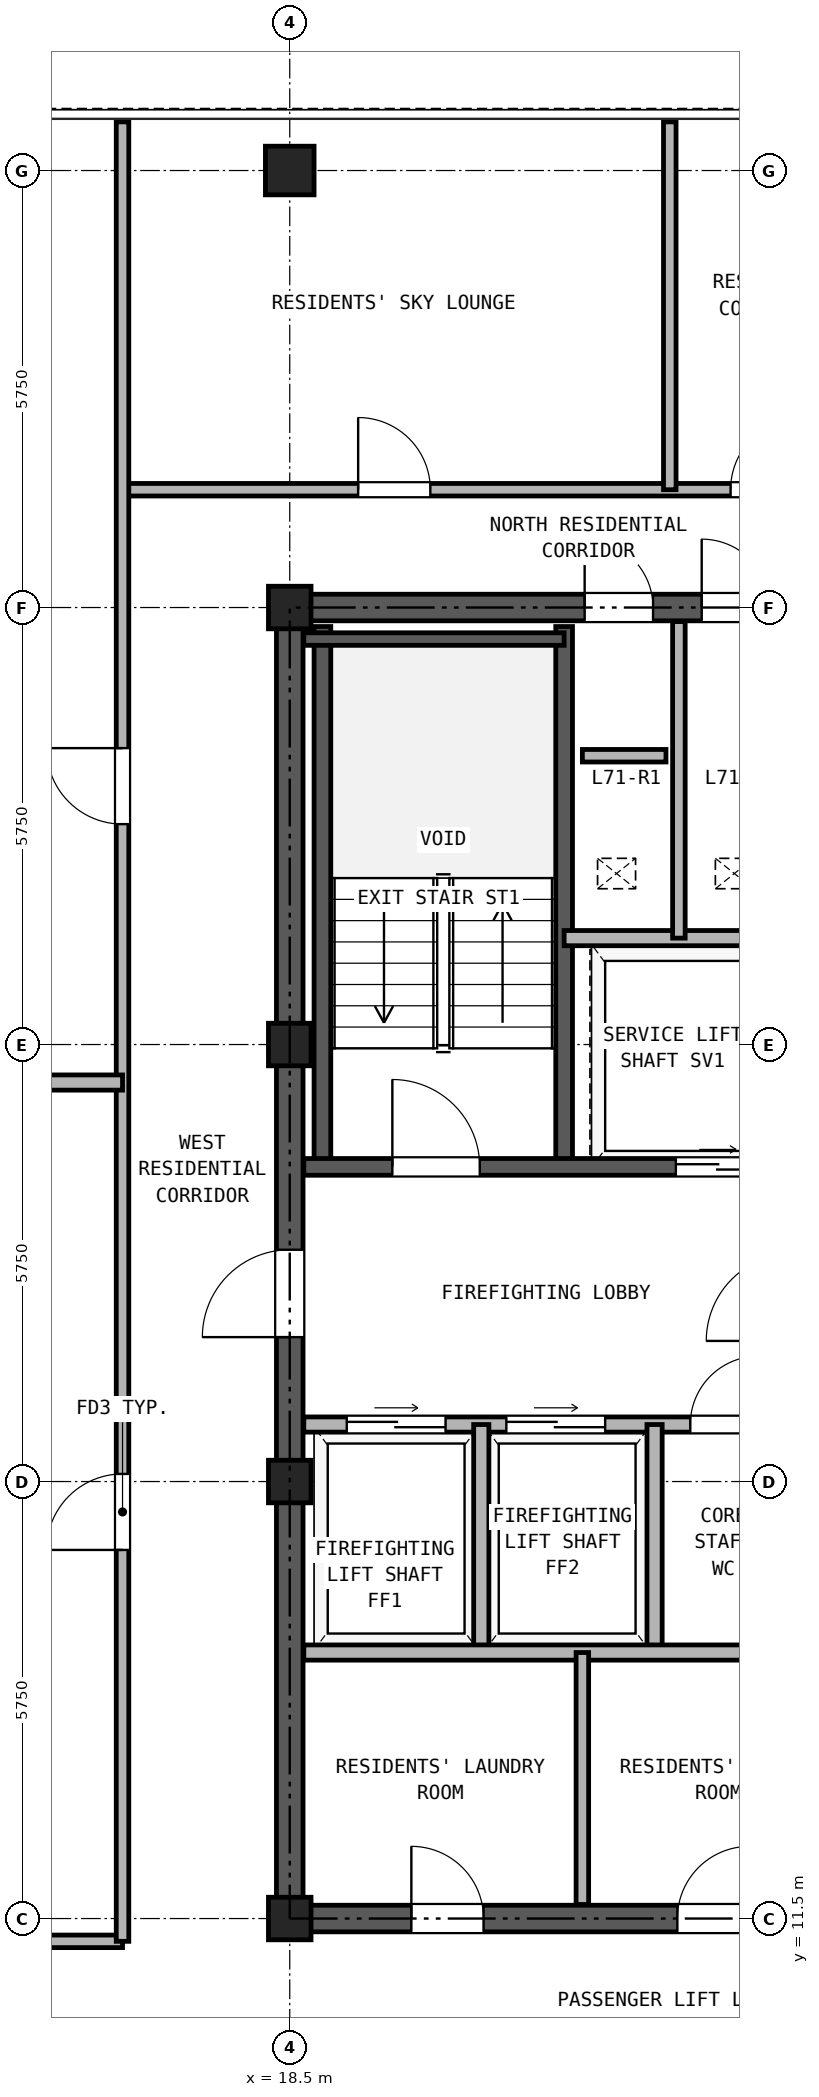
"""IFC4 building model, lengths in metres.
Left out: names, types, materials, properties, quantities, classifications, styles, units other than length and angle.
Written with IfcOpenShell. Run it as: python <this file> out.ifc"""

import sys

from ifc_helpers import new_model, si_unit, direction, frame, frame_2d, origin, origin_2d, place, context, subcontext, project, spatial, rectangle, hollow_rectangle, extrude, source, transform, mapped, element, fill, save


model = new_model("IFC4")
c1 = context("Model", 3, precision=1e-05, world=origin(), true_north=direction((0.0, 1.0)))
c2 = subcontext(c1, "Body", "Model", "MODEL_VIEW")
j1 = project(units=[si_unit("LENGTHUNIT", "METRE"), si_unit("PLANEANGLEUNIT", "RADIAN")], contexts=[c1])
p1 = place(None, origin())
s1 = spatial("IfcSite", under=j1, at=p1, CompositionType="ELEMENT")
p2 = place(p1, origin())
s2 = spatial("IfcBuilding", under=s1, at=p2, CompositionType="ELEMENT")
p3 = place(p2, frame((0.0, 0.0, 248.9)))
s3 = spatial("IfcBuildingStorey", under=s2, at=p3, CompositionType="ELEMENT", Elevation=248.9)
m1 = source(origin(), c2, "Body", "SweptSolid", [
    extrude(hollow_rectangle(XDim=0.64, YDim=0.64, WallThickness=0.035, at=origin_2d()), origin(), (0.0, 0.0, 1.0), 2.98),
])
p4 = place(p3, frame((18.5, 34.5, 0.0), z_axis=(0.0, 0.0, 1.0), x_axis=(1.0, 0.0, 0.0)))
e1 = element("IfcColumn", 1, at=p4, inside=s3, PredefinedType="COLUMN", context=c2, shape_type="MappedRepresentation", body=[
    mapped(m1, transform((0.0, 0.0, 0.0), x_axis=(1.0, 0.0, 0.0), y_axis=(0.0, 1.0, 0.0), z_axis=(0.0, 0.0, 1.0), scale=1.0)),
])
m2 = source(origin(), c2, "Body", "SweptSolid", [
    extrude(hollow_rectangle(XDim=0.56, YDim=0.56, WallThickness=0.03, at=origin_2d()), origin(), (0.0, 0.0, 1.0), 2.98),
])
for number, where, z_axis, x_axis in (
    (2, (18.5, 11.5, 0.0), (0.0, 0.0, 1.0), (1.0, 0.0, 0.0)),
    (3, (18.5, 17.25, 0.0), (0.0, 0.0, 1.0), (1.0, 0.0, 0.0)),
    (4, (18.5, 23.0, 0.0), (0.0, 0.0, 1.0), (1.0, 0.0, 0.0)),
    (5, (18.5, 28.75, 0.0), (0.0, 0.0, 1.0), (1.0, 0.0, 0.0)),
):
    element("IfcColumn", number, at=place(p3, frame(where, z_axis=z_axis, x_axis=x_axis)), inside=s3, PredefinedType="COLUMN", context=c2, shape_type="MappedRepresentation", body=[
        mapped(m2, transform((0.0, 0.0, 0.0), x_axis=(1.0, 0.0, 0.0), y_axis=(0.0, 1.0, 0.0), z_axis=(0.0, 0.0, 1.0), scale=1.0)),
    ])
p5 = place(p3, frame((18.325, 11.5, 0.0), z_axis=(0.0, 0.0, 1.0), x_axis=(1.0, 0.0, 0.0)))
e6 = element("IfcWall", 6, at=p5, inside=s3, PredefinedType="SHEAR", context=c2, shape_type="SweptSolid", body=[
    extrude(rectangle(XDim=10.35, YDim=0.35, at=frame_2d((5.175, 0.0))), origin(), (0.0, 0.0, 1.0), 2.98),
])
p6 = place(p5, frame((1.775, 0.0, 0.0)))
e7 = element("IfcOpeningElement", 7, at=p6, cuts=e6, PredefinedType="OPENING", context=c2, shape_type="SweptSolid", body=[
    extrude(rectangle(XDim=0.95, YDim=2.15, at=frame_2d((0.475, 1.075))), frame((0.0, 0.185, 0.0), z_axis=(0.0, -1.0, 0.0), x_axis=(1.0, 0.0, 0.0)), (0.0, 0.0, 1.0), 0.37),
])
p7 = place(p5, frame((5.275, 0.0, 0.0)))
e8 = element("IfcOpeningElement", 8, at=p7, cuts=e6, PredefinedType="OPENING", context=c2, shape_type="SweptSolid", body=[
    extrude(rectangle(XDim=0.95, YDim=2.15, at=frame_2d((0.475, 1.075))), frame((0.0, 0.185, 0.0), z_axis=(0.0, -1.0, 0.0), x_axis=(1.0, 0.0, 0.0)), (0.0, 0.0, 1.0), 0.37),
])
p8 = place(p5, frame((8.175, 0.0, 0.0)))
e9 = element("IfcOpeningElement", 9, at=p8, cuts=e6, PredefinedType="OPENING", context=c2, shape_type="SweptSolid", body=[
    extrude(rectangle(XDim=1.1, YDim=2.25, at=frame_2d((0.55, 1.125))), frame((0.0, 0.185, 0.0), z_axis=(0.0, -1.0, 0.0), x_axis=(1.0, 0.0, 0.0)), (0.0, 0.0, 1.0), 0.37),
])
p9 = place(p3, frame((18.325, 28.75, 0.0), z_axis=(0.0, 0.0, 1.0), x_axis=(1.0, 0.0, 0.0)))
e10 = element("IfcWall", 10, at=p9, inside=s3, PredefinedType="SHEAR", context=c2, shape_type="SweptSolid", body=[
    extrude(rectangle(XDim=10.35, YDim=0.35, at=frame_2d((5.175, 0.0))), origin(), (0.0, 0.0, 1.0), 2.98),
])
p10 = place(p9, frame((4.055, 0.0, 0.0)))
e11 = element("IfcOpeningElement", 11, at=p10, cuts=e10, PredefinedType="OPENING", context=c2, shape_type="SweptSolid", body=[
    extrude(rectangle(XDim=0.9, YDim=2.05, at=frame_2d((0.45, 1.025))), frame((0.0, 0.185, 0.0), z_axis=(0.0, -1.0, 0.0), x_axis=(1.0, 0.0, 0.0)), (0.0, 0.0, 1.0), 0.37),
])
p11 = place(p9, frame((5.595, 0.0, 0.0)))
e12 = element("IfcOpeningElement", 12, at=p11, cuts=e10, PredefinedType="OPENING", context=c2, shape_type="SweptSolid", body=[
    extrude(rectangle(XDim=0.9, YDim=2.05, at=frame_2d((0.45, 1.025))), frame((0.0, 0.185, 0.0), z_axis=(0.0, -1.0, 0.0), x_axis=(1.0, 0.0, 0.0)), (0.0, 0.0, 1.0), 0.37),
])
p12 = place(p3, frame((18.5, 11.675, 0.0), z_axis=(0.0, 0.0, 1.0), x_axis=(0.0, 1.0, 0.0)))
e13 = element("IfcWall", 13, at=p12, inside=s3, PredefinedType="SHEAR", context=c2, shape_type="SweptSolid", body=[
    extrude(rectangle(XDim=16.9, YDim=0.35, at=frame_2d((8.45, 0.0))), origin(), (0.0, 0.0, 1.0), 2.98),
])
p13 = place(p12, frame((7.475, 0.0, 0.0)))
e14 = element("IfcOpeningElement", 14, at=p13, cuts=e13, PredefinedType="OPENING", context=c2, shape_type="SweptSolid", body=[
    extrude(rectangle(XDim=1.15, YDim=2.2, at=frame_2d((0.575, 1.1))), frame((0.0, 0.185, 0.0), z_axis=(0.0, -1.0, 0.0), x_axis=(1.0, 0.0, 0.0)), (0.0, 0.0, 1.0), 0.37),
])
for number, where, z_axis, x_axis in (
    (15, (18.93, 21.39, 0.0), (0.0, 0.0, 1.0), (0.0, 1.0, 0.0)),
    (16, (22.11, 21.39, 0.0), (0.0, 0.0, 1.0), (0.0, 1.0, 0.0)),
):
    element("IfcWall", number, at=place(p3, frame(where, z_axis=z_axis, x_axis=x_axis)), inside=s3, PredefinedType="SOLIDWALL", context=c2, shape_type="SweptSolid", body=[
        extrude(rectangle(XDim=7.11, YDim=0.22, at=frame_2d((3.555, 0.0))), origin(), (0.0, 0.0, 1.0), 2.98),
    ])
p14 = place(p3, frame((18.685, 28.335, 0.0), z_axis=(0.0, 0.0, 1.0), x_axis=(1.0, 0.0, 0.0)))
e17 = element("IfcWall", 17, at=p14, inside=s3, PredefinedType="PARTITIONING", context=c2, shape_type="SweptSolid", body=[
    extrude(rectangle(XDim=3.425, YDim=0.165, at=frame_2d((1.712, 0.0))), origin(), (0.0, 0.0, 1.0), 2.98),
])
p15 = place(p3, frame((18.685, 21.39, 0.0), z_axis=(0.0, 0.0, 1.0), x_axis=(1.0, 0.0, 0.0)))
e18 = element("IfcWall", 18, at=p15, inside=s3, PredefinedType="SOLIDWALL", context=c2, shape_type="SweptSolid", body=[
    extrude(rectangle(XDim=6.445, YDim=0.22, at=frame_2d((3.222, 0.0))), origin(), (0.0, 0.0, 1.0), 2.98),
])
p16 = place(p15, frame((1.165, 0.0, 0.0)))
e19 = element("IfcOpeningElement", 19, at=p16, cuts=e18, PredefinedType="OPENING", context=c2, shape_type="SweptSolid", body=[
    extrude(rectangle(XDim=1.15, YDim=2.2, at=frame_2d((0.575, 1.1))), frame((0.0, 0.12, 0.0), z_axis=(0.0, -1.0, 0.0), x_axis=(1.0, 0.0, 0.0)), (0.0, 0.0, 1.0), 0.24),
])
p17 = place(p15, frame((4.895, 0.0, 0.0)))
e20 = element("IfcOpeningElement", 20, at=p17, cuts=e18, PredefinedType="OPENING", context=c2, shape_type="SweptSolid", body=[
    extrude(rectangle(XDim=1.1, YDim=2.25, at=frame_2d((0.55, 1.125))), frame((0.0, 0.12, 0.0), z_axis=(0.0, -1.0, 0.0), x_axis=(1.0, 0.0, 0.0)), (0.0, 0.0, 1.0), 0.24),
])
p18 = place(p3, frame((22.11, 24.4, 0.0), z_axis=(0.0, 0.0, 1.0), x_axis=(1.0, 0.0, 0.0)))
e21 = element("IfcWall", 21, at=p18, inside=s3, PredefinedType="PARTITIONING", context=c2, shape_type="SweptSolid", body=[
    extrude(rectangle(XDim=3.02, YDim=0.2, at=frame_2d((1.51, 0.0))), origin(), (0.0, 0.0, 1.0), 2.98),
])
p19 = place(p3, frame((23.62, 24.4, 0.0), z_axis=(0.0, 0.0, 1.0), x_axis=(0.0, 1.0, 0.0)))
e22 = element("IfcWall", 22, at=p19, inside=s3, PredefinedType="PARTITIONING", context=c2, shape_type="SweptSolid", body=[
    extrude(rectangle(XDim=4.165, YDim=0.165, at=frame_2d((2.083, 0.0))), origin(), (0.0, 0.0, 1.0), 2.98),
])
p20 = place(p3, frame((18.685, 18.0, 0.0), z_axis=(0.0, 0.0, 1.0), x_axis=(1.0, 0.0, 0.0)))
e23 = element("IfcWall", 23, at=p20, inside=s3, PredefinedType="PARTITIONING", context=c2, shape_type="SweptSolid", body=[
    extrude(rectangle(XDim=9.63, YDim=0.2, at=frame_2d((4.815, 0.0))), origin(), (0.0, 0.0, 1.0), 2.98),
])
p21 = place(p20, frame((0.565, 0.0, 0.0)))
e24 = element("IfcOpeningElement", 24, at=p21, cuts=e23, PredefinedType="OPENING", context=c2, shape_type="SweptSolid", body=[
    extrude(rectangle(XDim=1.3, YDim=2.3, at=frame_2d((0.65, 1.15))), frame((0.0, 0.11, 0.0), z_axis=(0.0, -1.0, 0.0), x_axis=(1.0, 0.0, 0.0)), (0.0, 0.0, 1.0), 0.22),
])
p22 = place(p20, frame((2.665, 0.0, 0.0)))
e25 = element("IfcOpeningElement", 25, at=p22, cuts=e23, PredefinedType="OPENING", context=c2, shape_type="SweptSolid", body=[
    extrude(rectangle(XDim=1.3, YDim=2.3, at=frame_2d((0.65, 1.15))), frame((0.0, 0.11, 0.0), z_axis=(0.0, -1.0, 0.0), x_axis=(1.0, 0.0, 0.0)), (0.0, 0.0, 1.0), 0.22),
])
p23 = place(p20, frame((5.085, 0.0, 0.0)))
e26 = element("IfcOpeningElement", 26, at=p23, cuts=e23, PredefinedType="OPENING", context=c2, shape_type="SweptSolid", body=[
    extrude(rectangle(XDim=0.9, YDim=2.05, at=frame_2d((0.45, 1.025))), frame((0.0, 0.11, 0.0), z_axis=(0.0, -1.0, 0.0), x_axis=(1.0, 0.0, 0.0)), (0.0, 0.0, 1.0), 0.22),
])
p24 = place(p20, frame((8.215, 0.0, 0.0)))
e27 = element("IfcOpeningElement", 27, at=p24, cuts=e23, PredefinedType="OPENING", context=c2, shape_type="SweptSolid", body=[
    extrude(rectangle(XDim=0.9, YDim=2.05, at=frame_2d((0.45, 1.025))), frame((0.0, 0.11, 0.0), z_axis=(0.0, -1.0, 0.0), x_axis=(1.0, 0.0, 0.0)), (0.0, 0.0, 1.0), 0.22),
])
for number, where, z_axis, x_axis in (
    (28, (21.02, 15.0, 0.0), (0.0, 0.0, 1.0), (0.0, 1.0, 0.0)),
    (29, (23.3, 15.0, 0.0), (0.0, 0.0, 1.0), (0.0, 1.0, 0.0)),
):
    element("IfcWall", number, at=place(p3, frame(where, z_axis=z_axis, x_axis=x_axis)), inside=s3, PredefinedType="PARTITIONING", context=c2, shape_type="SweptSolid", body=[
        extrude(rectangle(XDim=3.0, YDim=0.2, at=frame_2d((1.5, 0.0))), origin(), (0.0, 0.0, 1.0), 2.98),
    ])
p25 = place(p3, frame((18.685, 15.0, 0.0), z_axis=(0.0, 0.0, 1.0), x_axis=(1.0, 0.0, 0.0)))
e30 = element("IfcWall", 30, at=p25, inside=s3, PredefinedType="PARTITIONING", context=c2, shape_type="SweptSolid", body=[
    extrude(rectangle(XDim=9.63, YDim=0.2, at=frame_2d((4.815, 0.0))), origin(), (0.0, 0.0, 1.0), 2.98),
])
p26 = place(p3, frame((22.35, 11.685, 0.0), z_axis=(0.0, 0.0, 1.0), x_axis=(0.0, 1.0, 0.0)))
e31 = element("IfcWall", 31, at=p26, inside=s3, PredefinedType="PARTITIONING", context=c2, shape_type="SweptSolid", body=[
    extrude(rectangle(XDim=3.315, YDim=0.165, at=frame_2d((1.657, 0.0))), origin(), (0.0, 0.0, 1.0), 2.98),
])
p27 = place(p3, frame((8.56, 11.2, 0.0), z_axis=(0.0, 0.0, 1.0), x_axis=(1.0, 0.0, 0.0)))
e32 = element("IfcWall", 32, at=p27, inside=s3, PredefinedType="PARTITIONING", context=c2, shape_type="SweptSolid", body=[
    extrude(rectangle(XDim=7.74, YDim=0.165, at=frame_2d((3.87, 0.0))), origin(), (0.0, 0.0, 1.0), 2.98),
])
p28 = place(p3, frame((16.3, 30.3, 0.0), z_axis=(0.0, 0.0, 1.0), x_axis=(1.0, 0.0, 0.0)))
e33 = element("IfcWall", 33, at=p28, inside=s3, PredefinedType="PARTITIONING", context=c2, shape_type="SweptSolid", body=[
    extrude(rectangle(XDim=14.4, YDim=0.165, at=frame_2d((7.2, 0.0))), origin(), (0.0, 0.0, 1.0), 2.98),
])
p29 = place(p28, frame((3.1, 0.0, 0.0)))
e34 = element("IfcOpeningElement", 34, at=p29, cuts=e33, PredefinedType="OPENING", context=c2, shape_type="SweptSolid", body=[
    extrude(rectangle(XDim=0.95, YDim=2.15, at=frame_2d((0.475, 1.075))), frame((0.0, 0.093, 0.0), z_axis=(0.0, -1.0, 0.0), x_axis=(1.0, 0.0, 0.0)), (0.0, 0.0, 1.0), 0.185),
])
p30 = place(p28, frame((8.0, 0.0, 0.0)))
e35 = element("IfcOpeningElement", 35, at=p30, cuts=e33, PredefinedType="OPENING", context=c2, shape_type="SweptSolid", body=[
    extrude(rectangle(XDim=0.95, YDim=2.15, at=frame_2d((0.475, 1.075))), frame((0.0, 0.093, 0.0), z_axis=(0.0, -1.0, 0.0), x_axis=(1.0, 0.0, 0.0)), (0.0, 0.0, 1.0), 0.185),
])
p31 = place(p28, frame((10.8, 0.0, 0.0)))
e36 = element("IfcOpeningElement", 36, at=p31, cuts=e33, PredefinedType="OPENING", context=c2, shape_type="SweptSolid", body=[
    extrude(rectangle(XDim=0.92, YDim=2.1, at=frame_2d((0.46, 1.05))), frame((0.0, 0.093, 0.0), z_axis=(0.0, -1.0, 0.0), x_axis=(1.0, 0.0, 0.0)), (0.0, 0.0, 1.0), 0.185),
])
p32 = place(p3, frame((16.3, 11.2, 0.0), z_axis=(0.0, 0.0, 1.0), x_axis=(0.0, 1.0, 0.0)))
e37 = element("IfcWall", 37, at=p32, inside=s3, PredefinedType="PARTITIONING", context=c2, shape_type="SweptSolid", body=[
    extrude(rectangle(XDim=23.94, YDim=0.165, at=frame_2d((11.97, 0.0))), origin(), (0.0, 0.0, 1.0), 2.98),
])
p33 = place(p32, frame((5.15, 0.0, 0.0)))
e38 = element("IfcOpeningElement", 38, at=p33, cuts=e37, PredefinedType="OPENING", context=c2, shape_type="SweptSolid", body=[
    extrude(rectangle(XDim=1.0, YDim=2.15, at=frame_2d((0.5, 1.075))), frame((0.0, 0.093, 0.0), z_axis=(0.0, -1.0, 0.0), x_axis=(1.0, 0.0, 0.0)), (0.0, 0.0, 1.0), 0.185),
])
p34 = place(p32, frame((14.7, 0.0, 0.0)))
e39 = element("IfcOpeningElement", 39, at=p34, cuts=e37, PredefinedType="OPENING", context=c2, shape_type="SweptSolid", body=[
    extrude(rectangle(XDim=1.0, YDim=2.15, at=frame_2d((0.5, 1.075))), frame((0.0, 0.093, 0.0), z_axis=(0.0, -1.0, 0.0), x_axis=(1.0, 0.0, 0.0)), (0.0, 0.0, 1.0), 0.185),
])
p35 = place(p3, frame((5.36, 22.5, 0.0), z_axis=(0.0, 0.0, 1.0), x_axis=(1.0, 0.0, 0.0)))
e40 = element("IfcWall", 40, at=p35, inside=s3, PredefinedType="PARTITIONING", context=c2, shape_type="SweptSolid", body=[
    extrude(rectangle(XDim=10.94, YDim=0.2, at=frame_2d((5.47, 0.0))), origin(), (0.0, 0.0, 1.0), 2.98),
])
p36 = place(p3, frame((23.5, 30.3, 0.0), z_axis=(0.0, 0.0, 1.0), x_axis=(0.0, 1.0, 0.0)))
e41 = element("IfcWall", 41, at=p36, inside=s3, PredefinedType="PARTITIONING", context=c2, shape_type="SweptSolid", body=[
    extrude(rectangle(XDim=4.84, YDim=0.165, at=frame_2d((2.42, 0.0))), origin(), (0.0, 0.0, 1.0), 2.98),
])
p37 = place(p3, frame((22.35, 26.8, 0.0), z_axis=(0.0, 0.0, 1.0), x_axis=(1.0, 0.0, 0.0)))
e42 = element("IfcWall", 42, at=p37, inside=s3, PredefinedType="PARTITIONING", context=c2, shape_type="SweptSolid", body=[
    extrude(rectangle(XDim=1.1, YDim=0.165, at=frame_2d((0.55, 0.0))), origin(), (0.0, 0.0, 1.0), 2.98),
])
p38 = place(p16, frame((1.15, 0.0, 0.0), z_axis=(0.0, 0.0, 1.0), x_axis=(-1.0, 0.0, 0.0)))
e43 = element("IfcDoor", 43, at=p38, inside=s3, OperationType="SINGLE_SWING_LEFT", PredefinedType="DOOR", context=c2, shape_type="SweptSolid", body=[
    extrude(rectangle(XDim=1.15, YDim=2.2, at=frame_2d((0.575, 1.1))), frame((0.0, 0.025, 0.0), z_axis=(0.0, -1.0, 0.0), x_axis=(1.0, 0.0, 0.0)), (0.0, 0.0, 1.0), 0.05),
])
fill(e19, e43)
p39 = place(p17, frame((1.1, 0.0, 0.0), z_axis=(0.0, 0.0, 1.0), x_axis=(-1.0, 0.0, 0.0)))
e44 = element("IfcDoor", 44, at=p39, inside=s3, OperationType="DOUBLE_DOOR_SLIDING", PredefinedType="DOOR", context=c2, shape_type="SweptSolid", body=[
    extrude(rectangle(XDim=1.1, YDim=2.25, at=frame_2d((0.55, 1.125))), frame((0.0, 0.025, 0.0), z_axis=(0.0, -1.0, 0.0), x_axis=(1.0, 0.0, 0.0)), (0.0, 0.0, 1.0), 0.05),
])
fill(e20, e44)
p40 = place(p21, origin())
e45 = element("IfcDoor", 45, at=p40, inside=s3, OperationType="DOUBLE_DOOR_SLIDING", PredefinedType="DOOR", context=c2, shape_type="SweptSolid", body=[
    extrude(rectangle(XDim=1.3, YDim=2.3, at=frame_2d((0.65, 1.15))), frame((0.0, 0.025, 0.0), z_axis=(0.0, -1.0, 0.0), x_axis=(1.0, 0.0, 0.0)), (0.0, 0.0, 1.0), 0.05),
])
fill(e24, e45)
p41 = place(p22, origin())
e46 = element("IfcDoor", 46, at=p41, inside=s3, OperationType="DOUBLE_DOOR_SLIDING", PredefinedType="DOOR", context=c2, shape_type="SweptSolid", body=[
    extrude(rectangle(XDim=1.3, YDim=2.3, at=frame_2d((0.65, 1.15))), frame((0.0, 0.025, 0.0), z_axis=(0.0, -1.0, 0.0), x_axis=(1.0, 0.0, 0.0)), (0.0, 0.0, 1.0), 0.05),
])
fill(e25, e46)
p42 = place(p23, frame((0.9, 0.0, 0.0), z_axis=(0.0, 0.0, 1.0), x_axis=(-1.0, 0.0, 0.0)))
e47 = element("IfcDoor", 47, at=p42, inside=s3, OperationType="SINGLE_SWING_RIGHT", PredefinedType="DOOR", context=c2, shape_type="SweptSolid", body=[
    extrude(rectangle(XDim=0.9, YDim=2.05, at=frame_2d((0.45, 1.025))), frame((0.0, 0.025, 0.0), z_axis=(0.0, -1.0, 0.0), x_axis=(1.0, 0.0, 0.0)), (0.0, 0.0, 1.0), 0.05),
])
fill(e26, e47)
p43 = place(p13, frame((1.15, 0.0, 0.0), z_axis=(0.0, 0.0, 1.0), x_axis=(-1.0, 0.0, 0.0)))
e48 = element("IfcDoor", 48, at=p43, inside=s3, OperationType="SINGLE_SWING_LEFT", PredefinedType="DOOR", context=c2, shape_type="SweptSolid", body=[
    extrude(rectangle(XDim=1.15, YDim=2.2, at=frame_2d((0.575, 1.1))), frame((0.0, 0.025, 0.0), z_axis=(0.0, -1.0, 0.0), x_axis=(1.0, 0.0, 0.0)), (0.0, 0.0, 1.0), 0.05),
])
fill(e14, e48)
p44 = place(p10, origin())
e49 = element("IfcDoor", 49, at=p44, inside=s3, OperationType="SINGLE_SWING_LEFT", PredefinedType="DOOR", context=c2, shape_type="SweptSolid", body=[
    extrude(rectangle(XDim=0.9, YDim=2.05, at=frame_2d((0.45, 1.025))), frame((0.0, 0.025, 0.0), z_axis=(0.0, -1.0, 0.0), x_axis=(1.0, 0.0, 0.0)), (0.0, 0.0, 1.0), 0.05),
])
fill(e11, e49)
p45 = place(p11, origin())
e50 = element("IfcDoor", 50, at=p45, inside=s3, OperationType="SINGLE_SWING_LEFT", PredefinedType="DOOR", context=c2, shape_type="SweptSolid", body=[
    extrude(rectangle(XDim=0.9, YDim=2.05, at=frame_2d((0.45, 1.025))), frame((0.0, 0.025, 0.0), z_axis=(0.0, -1.0, 0.0), x_axis=(1.0, 0.0, 0.0)), (0.0, 0.0, 1.0), 0.05),
])
fill(e12, e50)
p46 = place(p6, frame((0.95, 0.0, 0.0), z_axis=(0.0, 0.0, 1.0), x_axis=(-1.0, 0.0, 0.0)))
e51 = element("IfcDoor", 51, at=p46, inside=s3, OperationType="SINGLE_SWING_LEFT", PredefinedType="DOOR", context=c2, shape_type="SweptSolid", body=[
    extrude(rectangle(XDim=0.95, YDim=2.15, at=frame_2d((0.475, 1.075))), frame((0.0, 0.025, 0.0), z_axis=(0.0, -1.0, 0.0), x_axis=(1.0, 0.0, 0.0)), (0.0, 0.0, 1.0), 0.05),
])
fill(e7, e51)
p47 = place(p7, frame((0.95, 0.0, 0.0), z_axis=(0.0, 0.0, 1.0), x_axis=(-1.0, 0.0, 0.0)))
e52 = element("IfcDoor", 52, at=p47, inside=s3, OperationType="SINGLE_SWING_RIGHT", PredefinedType="DOOR", context=c2, shape_type="SweptSolid", body=[
    extrude(rectangle(XDim=0.95, YDim=2.15, at=frame_2d((0.475, 1.075))), frame((0.0, 0.025, 0.0), z_axis=(0.0, -1.0, 0.0), x_axis=(1.0, 0.0, 0.0)), (0.0, 0.0, 1.0), 0.05),
])
fill(e8, e52)
p48 = place(p33, origin())
e53 = element("IfcDoor", 53, at=p48, inside=s3, OperationType="SINGLE_SWING_LEFT", PredefinedType="DOOR", context=c2, shape_type="SweptSolid", body=[
    extrude(rectangle(XDim=1.0, YDim=2.15, at=frame_2d((0.5, 1.075))), frame((0.0, 0.025, 0.0), z_axis=(0.0, -1.0, 0.0), x_axis=(1.0, 0.0, 0.0)), (0.0, 0.0, 1.0), 0.05),
])
fill(e38, e53)
p49 = place(p34, origin())
e54 = element("IfcDoor", 54, at=p49, inside=s3, OperationType="SINGLE_SWING_RIGHT", PredefinedType="DOOR", context=c2, shape_type="SweptSolid", body=[
    extrude(rectangle(XDim=1.0, YDim=2.15, at=frame_2d((0.5, 1.075))), frame((0.0, 0.025, 0.0), z_axis=(0.0, -1.0, 0.0), x_axis=(1.0, 0.0, 0.0)), (0.0, 0.0, 1.0), 0.05),
])
fill(e39, e54)
p50 = place(p29, origin())
e55 = element("IfcDoor", 55, at=p50, inside=s3, OperationType="SINGLE_SWING_LEFT", PredefinedType="DOOR", context=c2, shape_type="SweptSolid", body=[
    extrude(rectangle(XDim=0.95, YDim=2.15, at=frame_2d((0.475, 1.075))), frame((0.0, 0.025, 0.0), z_axis=(0.0, -1.0, 0.0), x_axis=(1.0, 0.0, 0.0)), (0.0, 0.0, 1.0), 0.05),
])
fill(e34, e55)
p51 = place(p30, origin())
e56 = element("IfcDoor", 56, at=p51, inside=s3, OperationType="SINGLE_SWING_RIGHT", PredefinedType="DOOR", context=c2, shape_type="SweptSolid", body=[
    extrude(rectangle(XDim=0.95, YDim=2.15, at=frame_2d((0.475, 1.075))), frame((0.0, 0.025, 0.0), z_axis=(0.0, -1.0, 0.0), x_axis=(1.0, 0.0, 0.0)), (0.0, 0.0, 1.0), 0.05),
])
fill(e35, e56)
save(model, sys.argv[1])
